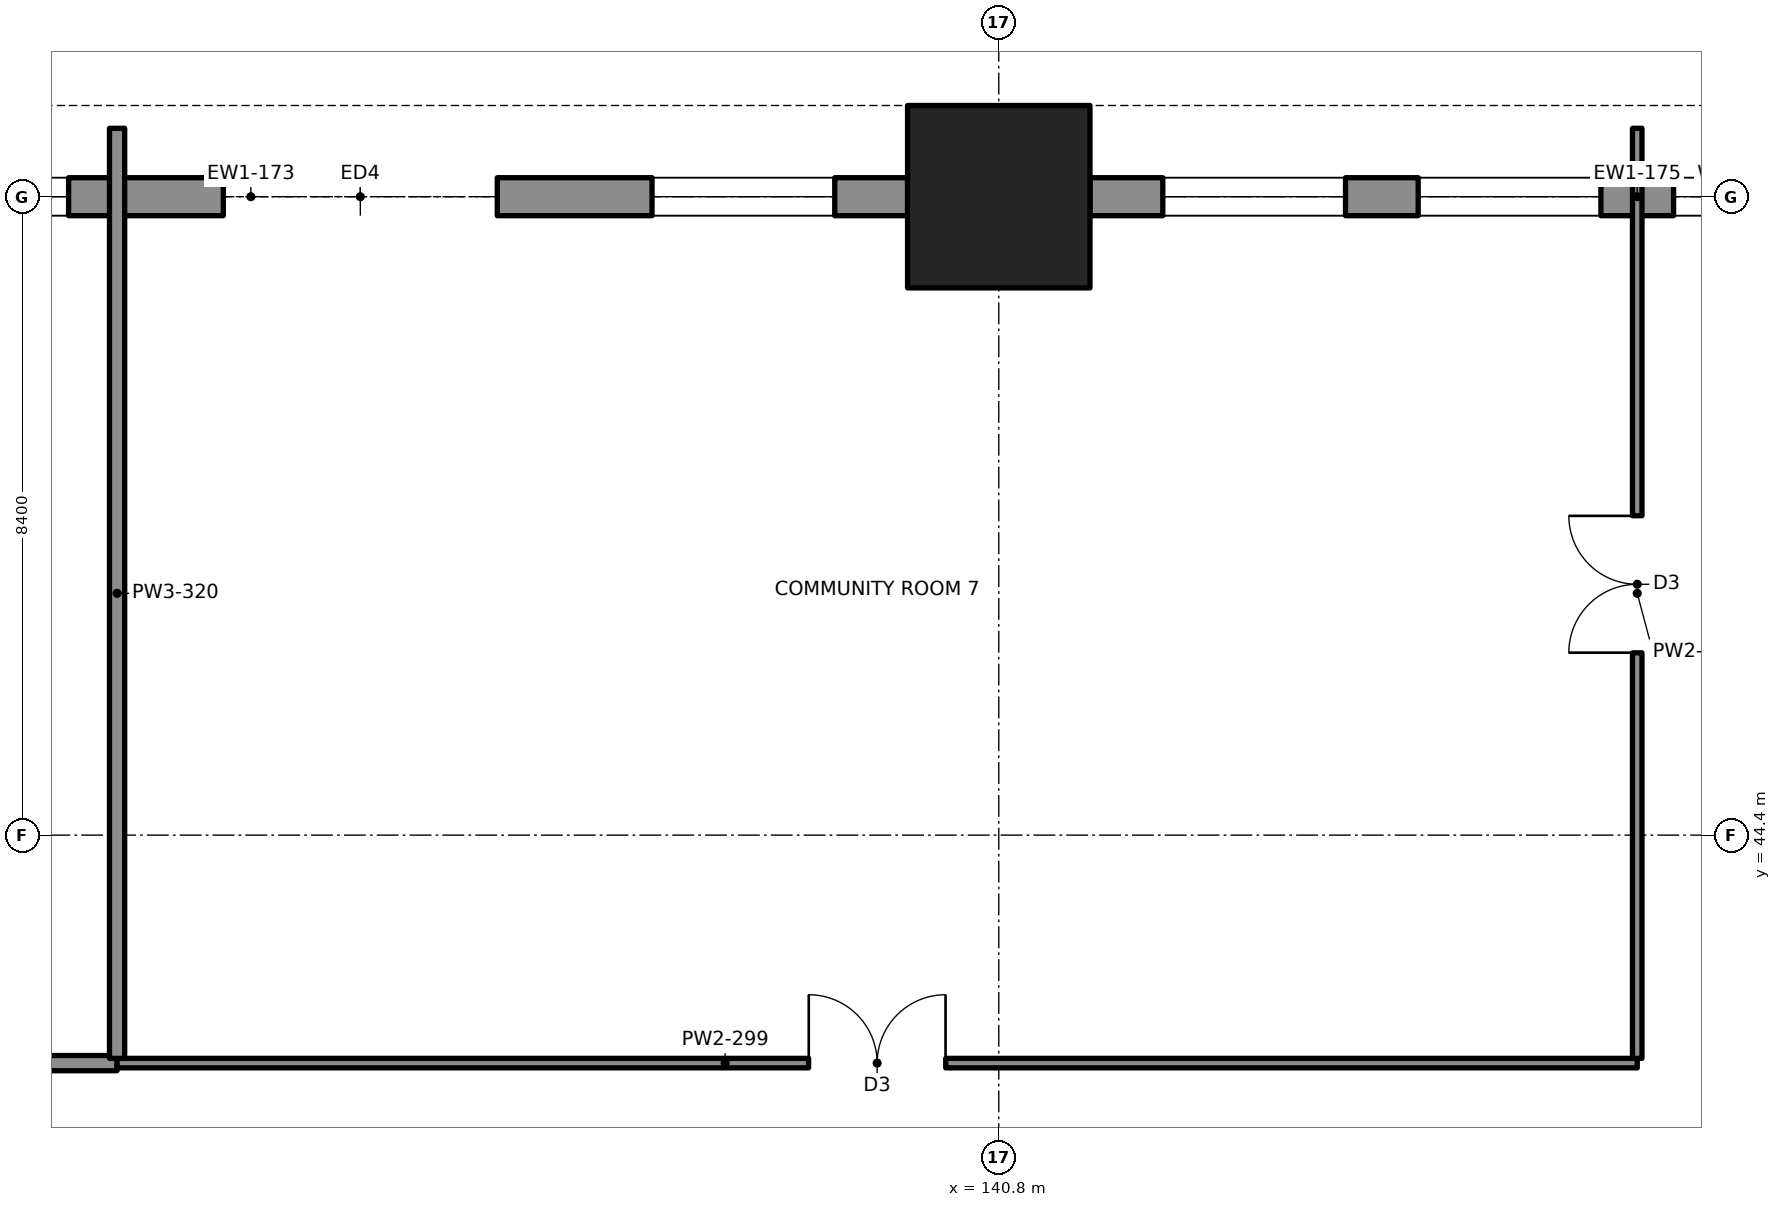
"""IFC4 building model, lengths in metres.
Left out: names, types, materials, properties, quantities, classifications, styles, units other than length and angle.
Written with IfcOpenShell. Run it as: python <this file> out.ifc"""

import sys

from ifc_helpers import new_model, si_unit, direction, frame, frame_2d, origin, origin_2d, place, context, subcontext, project, spatial, rectangle, extrude, element, fill, save


model = new_model("IFC4")
c1 = context("Model", 3, precision=1e-05, world=origin(), true_north=direction((0.0, 1.0)))
c2 = subcontext(c1, "Body", "Model", "MODEL_VIEW")
j1 = project(units=[si_unit("LENGTHUNIT", "METRE"), si_unit("PLANEANGLEUNIT", "RADIAN")], contexts=[c1])
p1 = place(None, origin())
s1 = spatial("IfcSite", under=j1, at=p1, CompositionType="ELEMENT")
p2 = place(p1, origin())
s2 = spatial("IfcBuilding", under=s1, at=p2, CompositionType="ELEMENT")
p3 = place(p2, origin())
s3 = spatial("IfcBuildingStorey", under=s2, at=p3, CompositionType="ELEMENT", Elevation=0.0)
p4 = place(p3, frame((140.8, 52.8, -0.9), z_axis=(0.0, 0.0, 1.0), x_axis=(1.0, 0.0, 0.0)))
e1 = element("IfcColumn", 1, at=p4, inside=s3, PredefinedType="COLUMN", context=c2, shape_type="SweptSolid", body=[
    extrude(rectangle(XDim=2.4, YDim=2.4, at=origin_2d()), origin(), (0.0, 0.0, 1.0), 5.3),
])
p5 = place(p3, frame((125.2, 52.8, 0.0), z_axis=(0.0, 0.0, 1.0), x_axis=(1.0, 0.0, 0.0)))
e2 = element("IfcWall", 2, at=p5, inside=s3, PredefinedType="SOLIDWALL", context=c2, shape_type="SweptSolid", body=[
    extrude(rectangle(XDim=14.4, YDim=0.5, at=frame_2d((7.2, 0.0))), origin(), (0.0, 0.0, 1.0), 3.65),
])
p6 = place(p5, frame((0.96, 0.0, 0.9)))
e3 = element("IfcOpeningElement", 3, at=p6, cuts=e2, PredefinedType="OPENING", context=c2, shape_type="SweptSolid", body=[
    extrude(rectangle(XDim=2.4, YDim=1.8, at=frame_2d((1.2, 0.9))), frame((0.0, 0.26, 0.0), z_axis=(0.0, -1.0, 0.0), x_axis=(1.0, 0.0, 0.0)), (0.0, 0.0, 1.0), 0.52),
])
p7 = place(p5, frame((11.04, 0.0, 0.9)))
e4 = element("IfcOpeningElement", 4, at=p7, cuts=e2, PredefinedType="OPENING", context=c2, shape_type="SweptSolid", body=[
    extrude(rectangle(XDim=2.4, YDim=1.8, at=frame_2d((1.2, 0.9))), frame((0.0, 0.26, 0.0), z_axis=(0.0, -1.0, 0.0), x_axis=(1.0, 0.0, 0.0)), (0.0, 0.0, 1.0), 0.52),
])
p8 = place(p5, frame((5.4, 0.0, 0.0)))
e5 = element("IfcOpeningElement", 5, at=p8, cuts=e2, PredefinedType="OPENING", context=c2, shape_type="SweptSolid", body=[
    extrude(rectangle(XDim=3.6, YDim=3.0, at=frame_2d((1.8, 1.5))), frame((0.0, 0.26, 0.0), z_axis=(0.0, -1.0, 0.0), x_axis=(1.0, 0.0, 0.0)), (0.0, 0.0, 1.0), 0.52),
])
p9 = place(p3, frame((142.0, 52.8, 0.0), z_axis=(0.0, 0.0, 1.0), x_axis=(1.0, 0.0, 0.0)))
e6 = element("IfcWall", 6, at=p9, inside=s3, PredefinedType="SOLIDWALL", context=c2, shape_type="SweptSolid", body=[
    extrude(rectangle(XDim=14.4, YDim=0.5, at=frame_2d((7.2, 0.0))), origin(), (0.0, 0.0, 1.0), 3.65),
])
p10 = place(p9, frame((0.96, 0.0, 0.9)))
e7 = element("IfcOpeningElement", 7, at=p10, cuts=e6, PredefinedType="OPENING", context=c2, shape_type="SweptSolid", body=[
    extrude(rectangle(XDim=2.4, YDim=1.8, at=frame_2d((1.2, 0.9))), frame((0.0, 0.26, 0.0), z_axis=(0.0, -1.0, 0.0), x_axis=(1.0, 0.0, 0.0)), (0.0, 0.0, 1.0), 0.52),
])
p11 = place(p9, frame((4.32, 0.0, 0.9)))
e8 = element("IfcOpeningElement", 8, at=p11, cuts=e6, PredefinedType="OPENING", context=c2, shape_type="SweptSolid", body=[
    extrude(rectangle(XDim=2.4, YDim=1.8, at=frame_2d((1.2, 0.9))), frame((0.0, 0.26, 0.0), z_axis=(0.0, -1.0, 0.0), x_axis=(1.0, 0.0, 0.0)), (0.0, 0.0, 1.0), 0.52),
])
p12 = place(p9, frame((7.68, 0.0, 0.9)))
e9 = element("IfcOpeningElement", 9, at=p12, cuts=e6, PredefinedType="OPENING", context=c2, shape_type="SweptSolid", body=[
    extrude(rectangle(XDim=2.4, YDim=1.8, at=frame_2d((1.2, 0.9))), frame((0.0, 0.26, 0.0), z_axis=(0.0, -1.0, 0.0), x_axis=(1.0, 0.0, 0.0)), (0.0, 0.0, 1.0), 0.52),
])
p13 = place(p9, frame((11.04, 0.0, 0.9)))
e10 = element("IfcOpeningElement", 10, at=p13, cuts=e6, PredefinedType="OPENING", context=c2, shape_type="SweptSolid", body=[
    extrude(rectangle(XDim=2.4, YDim=1.8, at=frame_2d((1.2, 0.9))), frame((0.0, 0.26, 0.0), z_axis=(0.0, -1.0, 0.0), x_axis=(1.0, 0.0, 0.0)), (0.0, 0.0, 1.0), 0.52),
])
p14 = place(p3, frame((118.0, 41.4, 0.0), z_axis=(0.0, 0.0, 1.0), x_axis=(1.0, 0.0, 0.0)))
e11 = element("IfcWall", 11, at=p14, inside=s3, PredefinedType="PARTITIONING", context=c2, shape_type="SweptSolid", body=[
    extrude(rectangle(XDim=11.2, YDim=0.2, at=frame_2d((5.6, 0.0))), origin(), (0.0, 0.0, 1.0), 3.65),
])
p15 = place(p14, frame((4.95, 0.0, 0.0)))
e12 = element("IfcOpeningElement", 12, at=p15, cuts=e11, PredefinedType="OPENING", context=c2, shape_type="SweptSolid", body=[
    extrude(rectangle(XDim=1.0, YDim=2.1, at=frame_2d((0.5, 1.05))), frame((0.0, 0.11, 0.0), z_axis=(0.0, -1.0, 0.0), x_axis=(1.0, 0.0, 0.0)), (0.0, 0.0, 1.0), 0.22),
])
p16 = place(p3, frame((129.2, 41.4, 0.0), z_axis=(0.0, 0.0, 1.0), x_axis=(1.0, 0.0, 0.0)))
e13 = element("IfcWall", 13, at=p16, inside=s3, PredefinedType="PARTITIONING", context=c2, shape_type="SweptSolid", body=[
    extrude(rectangle(XDim=20.0, YDim=0.125, at=frame_2d((10.0, 0.0))), origin(), (0.0, 0.0, 1.0), 3.65),
])
p17 = place(p16, frame((9.1, 0.0, 0.0)))
e14 = element("IfcOpeningElement", 14, at=p17, cuts=e13, PredefinedType="OPENING", context=c2, shape_type="SweptSolid", body=[
    extrude(rectangle(XDim=1.8, YDim=2.1, at=frame_2d((0.9, 1.05))), frame((0.0, 0.073, 0.0), z_axis=(0.0, -1.0, 0.0), x_axis=(1.0, 0.0, 0.0)), (0.0, 0.0, 1.0), 0.145),
])
p18 = place(p3, frame((129.2, 41.462, 0.0), z_axis=(0.0, 0.0, 1.0), x_axis=(0.0, 1.0, 0.0)))
e15 = element("IfcWall", 15, at=p18, inside=s3, PredefinedType="PARTITIONING", context=c2, shape_type="SweptSolid", body=[
    extrude(rectangle(XDim=12.238, YDim=0.2, at=frame_2d((6.119, 0.0))), origin(), (0.0, 0.0, 1.0), 3.65),
])
p19 = place(p3, frame((149.2, 41.462, 0.0), z_axis=(0.0, 0.0, 1.0), x_axis=(0.0, 1.0, 0.0)))
e16 = element("IfcWall", 16, at=p19, inside=s3, PredefinedType="PARTITIONING", context=c2, shape_type="SweptSolid", body=[
    extrude(rectangle(XDim=12.238, YDim=0.125, at=frame_2d((6.119, 0.0))), origin(), (0.0, 0.0, 1.0), 3.65),
])
p20 = place(p19, frame((5.338, 0.0, 0.0)))
e17 = element("IfcOpeningElement", 17, at=p20, cuts=e16, PredefinedType="OPENING", context=c2, shape_type="SweptSolid", body=[
    extrude(rectangle(XDim=1.8, YDim=2.1, at=frame_2d((0.9, 1.05))), frame((0.0, 0.073, 0.0), z_axis=(0.0, -1.0, 0.0), x_axis=(1.0, 0.0, 0.0)), (0.0, 0.0, 1.0), 0.145),
])
p21 = place(p6, origin())
e18 = element("IfcWindow", 18, at=p21, inside=s3, PartitioningType="SINGLE_PANEL", PredefinedType="WINDOW", context=c2, shape_type="SweptSolid", body=[
    extrude(rectangle(XDim=2.4, YDim=1.8, at=frame_2d((1.2, 0.9))), frame((0.0, 0.03, 0.0), z_axis=(0.0, -1.0, 0.0), x_axis=(1.0, 0.0, 0.0)), (0.0, 0.0, 1.0), 0.06),
])
fill(e3, e18)
p22 = place(p7, origin())
e19 = element("IfcWindow", 19, at=p22, inside=s3, PartitioningType="SINGLE_PANEL", PredefinedType="WINDOW", context=c2, shape_type="SweptSolid", body=[
    extrude(rectangle(XDim=2.4, YDim=1.8, at=frame_2d((1.2, 0.9))), frame((0.0, 0.03, 0.0), z_axis=(0.0, -1.0, 0.0), x_axis=(1.0, 0.0, 0.0)), (0.0, 0.0, 1.0), 0.06),
])
fill(e4, e19)
p23 = place(p8, origin())
e20 = element("IfcDoor", 20, at=p23, inside=s3, OperationType="ROLLINGUP", PredefinedType="DOOR", context=c2, shape_type="SweptSolid", body=[
    extrude(rectangle(XDim=3.6, YDim=3.0, at=frame_2d((1.8, 1.5))), frame((0.0, 0.025, 0.0), z_axis=(0.0, -1.0, 0.0), x_axis=(1.0, 0.0, 0.0)), (0.0, 0.0, 1.0), 0.05),
])
fill(e5, e20)
p24 = place(p10, origin())
e21 = element("IfcWindow", 21, at=p24, inside=s3, PartitioningType="SINGLE_PANEL", PredefinedType="WINDOW", context=c2, shape_type="SweptSolid", body=[
    extrude(rectangle(XDim=2.4, YDim=1.8, at=frame_2d((1.2, 0.9))), frame((0.0, 0.03, 0.0), z_axis=(0.0, -1.0, 0.0), x_axis=(1.0, 0.0, 0.0)), (0.0, 0.0, 1.0), 0.06),
])
fill(e7, e21)
p25 = place(p11, origin())
e22 = element("IfcWindow", 22, at=p25, inside=s3, PartitioningType="SINGLE_PANEL", PredefinedType="WINDOW", context=c2, shape_type="SweptSolid", body=[
    extrude(rectangle(XDim=2.4, YDim=1.8, at=frame_2d((1.2, 0.9))), frame((0.0, 0.03, 0.0), z_axis=(0.0, -1.0, 0.0), x_axis=(1.0, 0.0, 0.0)), (0.0, 0.0, 1.0), 0.06),
])
fill(e8, e22)
p26 = place(p12, origin())
e23 = element("IfcWindow", 23, at=p26, inside=s3, PartitioningType="SINGLE_PANEL", PredefinedType="WINDOW", context=c2, shape_type="SweptSolid", body=[
    extrude(rectangle(XDim=2.4, YDim=1.8, at=frame_2d((1.2, 0.9))), frame((0.0, 0.03, 0.0), z_axis=(0.0, -1.0, 0.0), x_axis=(1.0, 0.0, 0.0)), (0.0, 0.0, 1.0), 0.06),
])
fill(e9, e23)
p27 = place(p17, origin())
e24 = element("IfcDoor", 24, at=p27, inside=s3, OperationType="DOUBLE_DOOR_SINGLE_SWING", PredefinedType="DOOR", context=c2, shape_type="SweptSolid", body=[
    extrude(rectangle(XDim=1.8, YDim=2.1, at=frame_2d((0.9, 1.05))), frame((0.0, 0.025, 0.0), z_axis=(0.0, -1.0, 0.0), x_axis=(1.0, 0.0, 0.0)), (0.0, 0.0, 1.0), 0.05),
])
fill(e14, e24)
p28 = place(p20, origin())
e25 = element("IfcDoor", 25, at=p28, inside=s3, OperationType="DOUBLE_DOOR_SINGLE_SWING", PredefinedType="DOOR", context=c2, shape_type="SweptSolid", body=[
    extrude(rectangle(XDim=1.8, YDim=2.1, at=frame_2d((0.9, 1.05))), frame((0.0, 0.025, 0.0), z_axis=(0.0, -1.0, 0.0), x_axis=(1.0, 0.0, 0.0)), (0.0, 0.0, 1.0), 0.05),
])
fill(e17, e25)
save(model, sys.argv[1])
